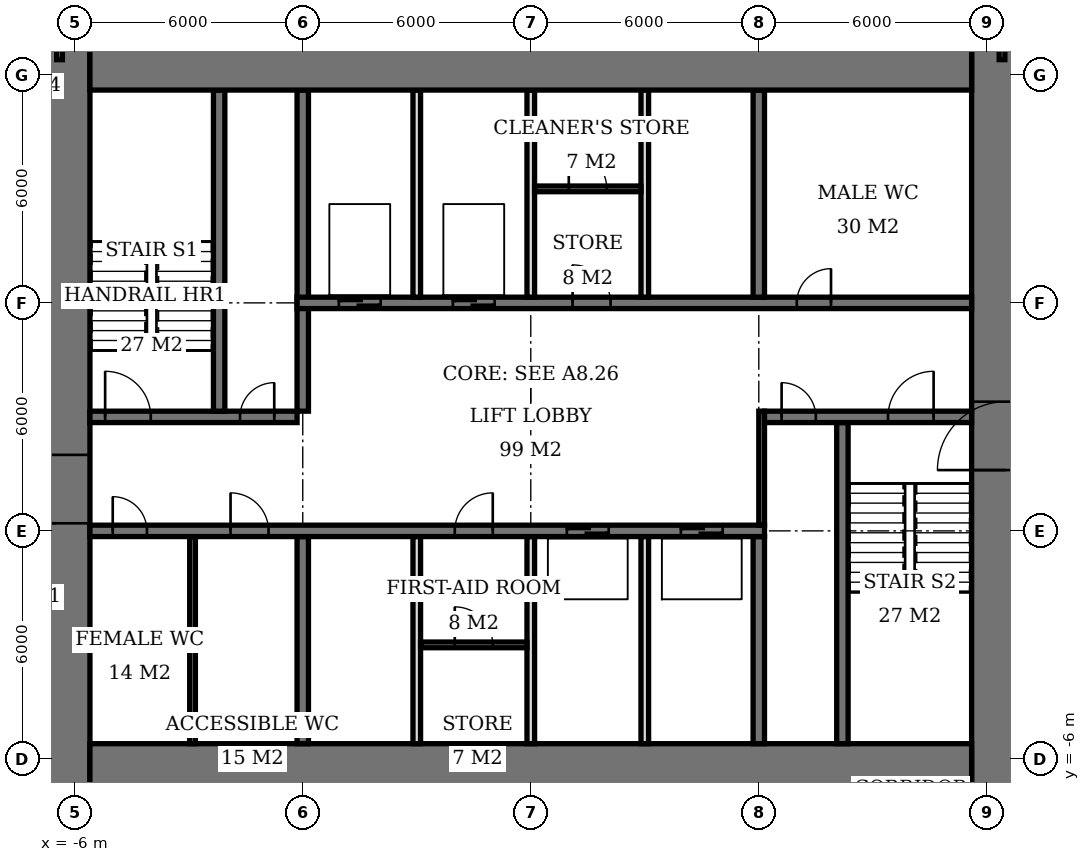
"""IFC4 building model, lengths in metres.
Left out: names, types, materials, properties, quantities, classifications, styles, units other than length and angle.
Written with IfcOpenShell. Run it as: python <this file> out.ifc"""

import sys

from ifc_helpers import new_model, si_unit, direction, frame, frame_2d, origin, place, context, subcontext, project, spatial, rectangle, extrude, element, fill, save


model = new_model("IFC4")
c1 = context("Model", 3, precision=1e-05, world=origin(), true_north=direction((0.0, 1.0)))
c2 = subcontext(c1, "Body", "Model", "MODEL_VIEW")
j1 = project(units=[si_unit("LENGTHUNIT", "METRE"), si_unit("PLANEANGLEUNIT", "RADIAN")], contexts=[c1])
p1 = place(None, origin())
s1 = spatial("IfcSite", under=j1, at=p1, CompositionType="ELEMENT")
p2 = place(p1, origin())
s2 = spatial("IfcBuilding", under=s1, at=p2, CompositionType="ELEMENT")
p3 = place(p2, frame((0.0, 0.0, 204.5)))
s3 = spatial("IfcBuildingStorey", under=s2, at=p3, CompositionType="ELEMENT", Elevation=204.5)
for number, where, z_axis, x_axis in (
    (1, (-5.6, -6.6, 0.0), (0.0, 0.0, 1.0), (1.0, 0.0, 0.0)),
    (2, (-5.6, 12.6, 0.0), (0.0, 0.0, 1.0), (1.0, 0.0, 0.0)),
):
    element("IfcWall", number, at=place(p3, frame(where, z_axis=z_axis, x_axis=x_axis)), inside=s3, PredefinedType="SHEAR", context=c2, shape_type="SweptSolid", body=[
        extrude(rectangle(XDim=23.2, YDim=2.0, at=frame_2d((11.6, 0.0))), origin(), (0.0, 0.0, 1.0), 3.9),
    ])
p4 = place(p3, frame((-6.5, -7.6, 0.0), z_axis=(0.0, 0.0, 1.0), x_axis=(0.0, 1.0, 0.0)))
e3 = element("IfcWall", 3, at=p4, inside=s3, PredefinedType="SHEAR", context=c2, shape_type="SweptSolid", body=[
    extrude(rectangle(XDim=21.2, YDim=1.8, at=frame_2d((10.6, 0.0))), origin(), (0.0, 0.0, 1.0), 3.9),
])
p5 = place(p4, frame((7.8, 0.0, 0.0)))
e4 = element("IfcOpeningElement", 4, at=p5, cuts=e3, PredefinedType="OPENING", context=c2, shape_type="SweptSolid", body=[
    extrude(rectangle(XDim=1.8, YDim=2.4, at=frame_2d((0.9, 1.2))), frame((0.0, 0.91, 0.0), z_axis=(0.0, -1.0, 0.0), x_axis=(1.0, 0.0, 0.0)), (0.0, 0.0, 1.0), 1.82),
])
p6 = place(p3, frame((18.5, -7.6, 0.0), z_axis=(0.0, 0.0, 1.0), x_axis=(0.0, 1.0, 0.0)))
e5 = element("IfcWall", 5, at=p6, inside=s3, PredefinedType="SHEAR", context=c2, shape_type="SweptSolid", body=[
    extrude(rectangle(XDim=21.2, YDim=1.8, at=frame_2d((10.6, 0.0))), origin(), (0.0, 0.0, 1.0), 3.9),
])
p7 = place(p6, frame((9.2, 0.0, 0.0)))
e6 = element("IfcOpeningElement", 6, at=p7, cuts=e5, PredefinedType="OPENING", context=c2, shape_type="SweptSolid", body=[
    extrude(rectangle(XDim=1.8, YDim=2.4, at=frame_2d((0.9, 1.2))), frame((0.0, 0.91, 0.0), z_axis=(0.0, -1.0, 0.0), x_axis=(1.0, 0.0, 0.0)), (0.0, 0.0, 1.0), 1.82),
])
p8 = place(p3, frame((-5.6, 0.0, 0.0), z_axis=(0.0, 0.0, 1.0), x_axis=(1.0, 0.0, 0.0)))
e7 = element("IfcWall", 7, at=p8, inside=s3, PredefinedType="SHEAR", context=c2, shape_type="SweptSolid", body=[
    extrude(rectangle(XDim=17.75, YDim=0.3, at=frame_2d((8.875, 0.0))), origin(), (0.0, 0.0, 1.0), 3.9),
])
p9 = place(p8, frame((0.6, 0.0, 0.0)))
e8 = element("IfcOpeningElement", 8, at=p9, cuts=e7, PredefinedType="OPENING", context=c2, shape_type="SweptSolid", body=[
    extrude(rectangle(XDim=0.9, YDim=2.1, at=frame_2d((0.45, 1.05))), frame((0.0, 0.16, 0.0), z_axis=(0.0, -1.0, 0.0), x_axis=(1.0, 0.0, 0.0)), (0.0, 0.0, 1.0), 0.32),
])
p10 = place(p8, frame((3.7, 0.0, 0.0)))
e9 = element("IfcOpeningElement", 9, at=p10, cuts=e7, PredefinedType="OPENING", context=c2, shape_type="SweptSolid", body=[
    extrude(rectangle(XDim=1.0, YDim=2.1, at=frame_2d((0.5, 1.05))), frame((0.0, 0.16, 0.0), z_axis=(0.0, -1.0, 0.0), x_axis=(1.0, 0.0, 0.0)), (0.0, 0.0, 1.0), 0.32),
])
p11 = place(p8, frame((9.6, 0.0, 0.0)))
e10 = element("IfcOpeningElement", 10, at=p11, cuts=e7, PredefinedType="OPENING", context=c2, shape_type="SweptSolid", body=[
    extrude(rectangle(XDim=1.0, YDim=2.1, at=frame_2d((0.5, 1.05))), frame((0.0, 0.16, 0.0), z_axis=(0.0, -1.0, 0.0), x_axis=(1.0, 0.0, 0.0)), (0.0, 0.0, 1.0), 0.32),
])
p12 = place(p8, frame((12.55, 0.0, 0.0)))
e11 = element("IfcOpeningElement", 11, at=p12, cuts=e7, PredefinedType="OPENING", context=c2, shape_type="SweptSolid", body=[
    extrude(rectangle(XDim=1.1, YDim=2.1, at=frame_2d((0.55, 1.05))), frame((0.0, 0.16, 0.0), z_axis=(0.0, -1.0, 0.0), x_axis=(1.0, 0.0, 0.0)), (0.0, 0.0, 1.0), 0.32),
])
p13 = place(p8, frame((15.55, 0.0, 0.0)))
e12 = element("IfcOpeningElement", 12, at=p13, cuts=e7, PredefinedType="OPENING", context=c2, shape_type="SweptSolid", body=[
    extrude(rectangle(XDim=1.1, YDim=2.1, at=frame_2d((0.55, 1.05))), frame((0.0, 0.16, 0.0), z_axis=(0.0, -1.0, 0.0), x_axis=(1.0, 0.0, 0.0)), (0.0, 0.0, 1.0), 0.32),
])
p14 = place(p3, frame((-5.6, 3.0, 0.0), z_axis=(0.0, 0.0, 1.0), x_axis=(1.0, 0.0, 0.0)))
e13 = element("IfcWall", 13, at=p14, inside=s3, PredefinedType="SHEAR", context=c2, shape_type="SweptSolid", body=[
    extrude(rectangle(XDim=5.45, YDim=0.3, at=frame_2d((2.725, 0.0))), origin(), (0.0, 0.0, 1.0), 3.9),
])
p15 = place(p14, frame((0.4, 0.0, 0.0)))
e14 = element("IfcOpeningElement", 14, at=p15, cuts=e13, PredefinedType="OPENING", context=c2, shape_type="SweptSolid", body=[
    extrude(rectangle(XDim=1.2, YDim=2.1, at=frame_2d((0.6, 1.05))), frame((0.0, 0.16, 0.0), z_axis=(0.0, -1.0, 0.0), x_axis=(1.0, 0.0, 0.0)), (0.0, 0.0, 1.0), 0.32),
])
p16 = place(p14, frame((3.95, 0.0, 0.0)))
e15 = element("IfcOpeningElement", 15, at=p16, cuts=e13, PredefinedType="OPENING", context=c2, shape_type="SweptSolid", body=[
    extrude(rectangle(XDim=0.9, YDim=2.1, at=frame_2d((0.45, 1.05))), frame((0.0, 0.16, 0.0), z_axis=(0.0, -1.0, 0.0), x_axis=(1.0, 0.0, 0.0)), (0.0, 0.0, 1.0), 0.32),
])
p17 = place(p3, frame((12.15, 3.0, 0.0), z_axis=(0.0, 0.0, 1.0), x_axis=(1.0, 0.0, 0.0)))
e16 = element("IfcWall", 16, at=p17, inside=s3, PredefinedType="SHEAR", context=c2, shape_type="SweptSolid", body=[
    extrude(rectangle(XDim=5.45, YDim=0.3, at=frame_2d((2.725, 0.0))), origin(), (0.0, 0.0, 1.0), 3.9),
])
p18 = place(p17, frame((3.25, 0.0, 0.0)))
e17 = element("IfcOpeningElement", 17, at=p18, cuts=e16, PredefinedType="OPENING", context=c2, shape_type="SweptSolid", body=[
    extrude(rectangle(XDim=1.2, YDim=2.1, at=frame_2d((0.6, 1.05))), frame((0.0, 0.16, 0.0), z_axis=(0.0, -1.0, 0.0), x_axis=(1.0, 0.0, 0.0)), (0.0, 0.0, 1.0), 0.32),
])
p19 = place(p17, frame((0.45, 0.0, 0.0)))
e18 = element("IfcOpeningElement", 18, at=p19, cuts=e16, PredefinedType="OPENING", context=c2, shape_type="SweptSolid", body=[
    extrude(rectangle(XDim=0.9, YDim=2.1, at=frame_2d((0.45, 1.05))), frame((0.0, 0.16, 0.0), z_axis=(0.0, -1.0, 0.0), x_axis=(1.0, 0.0, 0.0)), (0.0, 0.0, 1.0), 0.32),
])
p20 = place(p3, frame((-0.15, 6.0, 0.0), z_axis=(0.0, 0.0, 1.0), x_axis=(1.0, 0.0, 0.0)))
e19 = element("IfcWall", 19, at=p20, inside=s3, PredefinedType="SHEAR", context=c2, shape_type="SweptSolid", body=[
    extrude(rectangle(XDim=17.75, YDim=0.3, at=frame_2d((8.875, 0.0))), origin(), (0.0, 0.0, 1.0), 3.9),
])
p21 = place(p20, frame((13.15, 0.0, 0.0)))
e20 = element("IfcOpeningElement", 20, at=p21, cuts=e19, PredefinedType="OPENING", context=c2, shape_type="SweptSolid", body=[
    extrude(rectangle(XDim=0.9, YDim=2.1, at=frame_2d((0.45, 1.05))), frame((0.0, 0.16, 0.0), z_axis=(0.0, -1.0, 0.0), x_axis=(1.0, 0.0, 0.0)), (0.0, 0.0, 1.0), 0.32),
])
p22 = place(p20, frame((7.25, 0.0, 0.0)))
e21 = element("IfcOpeningElement", 21, at=p22, cuts=e19, PredefinedType="OPENING", context=c2, shape_type="SweptSolid", body=[
    extrude(rectangle(XDim=1.0, YDim=2.1, at=frame_2d((0.5, 1.05))), frame((0.0, 0.16, 0.0), z_axis=(0.0, -1.0, 0.0), x_axis=(1.0, 0.0, 0.0)), (0.0, 0.0, 1.0), 0.32),
])
p23 = place(p20, frame((1.1, 0.0, 0.0)))
e22 = element("IfcOpeningElement", 22, at=p23, cuts=e19, PredefinedType="OPENING", context=c2, shape_type="SweptSolid", body=[
    extrude(rectangle(XDim=1.1, YDim=2.1, at=frame_2d((0.55, 1.05))), frame((0.0, 0.16, 0.0), z_axis=(0.0, -1.0, 0.0), x_axis=(1.0, 0.0, 0.0)), (0.0, 0.0, 1.0), 0.32),
])
p24 = place(p20, frame((4.1, 0.0, 0.0)))
e23 = element("IfcOpeningElement", 23, at=p24, cuts=e19, PredefinedType="OPENING", context=c2, shape_type="SweptSolid", body=[
    extrude(rectangle(XDim=1.1, YDim=2.1, at=frame_2d((0.55, 1.05))), frame((0.0, 0.16, 0.0), z_axis=(0.0, -1.0, 0.0), x_axis=(1.0, 0.0, 0.0)), (0.0, 0.0, 1.0), 0.32),
])
p25 = place(p3, frame((0.0, -5.6, 0.0), z_axis=(0.0, 0.0, 1.0), x_axis=(0.0, 1.0, 0.0)))
e24 = element("IfcWall", 24, at=p25, inside=s3, PredefinedType="SHEAR", context=c2, shape_type="SweptSolid", body=[
    extrude(rectangle(XDim=5.45, YDim=0.3, at=frame_2d((2.725, 0.0))), origin(), (0.0, 0.0, 1.0), 3.9),
])
p26 = place(p3, frame((0.0, 3.15, 0.0), z_axis=(0.0, 0.0, 1.0), x_axis=(0.0, 1.0, 0.0)))
e25 = element("IfcWall", 25, at=p26, inside=s3, PredefinedType="SHEAR", context=c2, shape_type="SweptSolid", body=[
    extrude(rectangle(XDim=8.45, YDim=0.3, at=frame_2d((4.225, 0.0))), origin(), (0.0, 0.0, 1.0), 3.9),
])
for number, where, z_axis, x_axis in (
    (26, (12.0, -5.6, 0.0), (0.0, 0.0, 1.0), (0.0, 1.0, 0.0)),
    (27, (12.0, 6.15, 0.0), (0.0, 0.0, 1.0), (0.0, 1.0, 0.0)),
):
    element("IfcWall", number, at=place(p3, frame(where, z_axis=z_axis, x_axis=x_axis)), inside=s3, PredefinedType="SHEAR", context=c2, shape_type="SweptSolid", body=[
        extrude(rectangle(XDim=5.45, YDim=0.3, at=frame_2d((2.725, 0.0))), origin(), (0.0, 0.0, 1.0), 3.9),
    ])
for number, where, z_axis, x_axis in (
    (28, (-2.2, 3.15, 0.0), (0.0, 0.0, 1.0), (0.0, 1.0, 0.0)),
    (29, (14.2, -5.6, 0.0), (0.0, 0.0, 1.0), (0.0, 1.0, 0.0)),
):
    element("IfcWall", number, at=place(p3, frame(where, z_axis=z_axis, x_axis=x_axis)), inside=s3, PredefinedType="SHEAR", context=c2, shape_type="SweptSolid", body=[
        extrude(rectangle(XDim=8.45, YDim=0.3, at=frame_2d((4.225, 0.0))), origin(), (0.0, 0.0, 1.0), 3.9),
    ])
for number, where, z_axis, x_axis in (
    (30, (3.0, 6.15, 0.0), (0.0, 0.0, 1.0), (0.0, 1.0, 0.0)),
    (31, (6.0, 6.15, 0.0), (0.0, 0.0, 1.0), (0.0, 1.0, 0.0)),
    (32, (9.0, 6.15, 0.0), (0.0, 0.0, 1.0), (0.0, 1.0, 0.0)),
    (33, (3.0, -5.6, 0.0), (0.0, 0.0, 1.0), (0.0, 1.0, 0.0)),
    (34, (6.0, -5.6, 0.0), (0.0, 0.0, 1.0), (0.0, 1.0, 0.0)),
    (35, (9.0, -5.6, 0.0), (0.0, 0.0, 1.0), (0.0, 1.0, 0.0)),
):
    element("IfcWall", number, at=place(p3, frame(where, z_axis=z_axis, x_axis=x_axis)), inside=s3, PredefinedType="SOLIDWALL", context=c2, shape_type="SweptSolid", body=[
        extrude(rectangle(XDim=5.45, YDim=0.2, at=frame_2d((2.725, 0.0))), origin(), (0.0, 0.0, 1.0), 3.9),
    ])
p27 = place(p3, frame((-2.9, -5.6, 0.0), z_axis=(0.0, 0.0, 1.0), x_axis=(0.0, 1.0, 0.0)))
e36 = element("IfcWall", 36, at=p27, inside=s3, PredefinedType="PLUMBINGWALL", context=c2, shape_type="SweptSolid", body=[
    extrude(rectangle(XDim=5.45, YDim=0.15, at=frame_2d((2.725, 0.0))), origin(), (0.0, 0.0, 1.0), 3.65),
])
p28 = place(p3, frame((6.1, 9.0, 0.0), z_axis=(0.0, 0.0, 1.0), x_axis=(1.0, 0.0, 0.0)))
e37 = element("IfcWall", 37, at=p28, inside=s3, PredefinedType="PARTITIONING", context=c2, shape_type="SweptSolid", body=[
    extrude(rectangle(XDim=2.8, YDim=0.15, at=frame_2d((1.4, 0.0))), origin(), (0.0, 0.0, 1.0), 3.65),
])
p29 = place(p28, frame((0.9, 0.0, 0.0)))
e38 = element("IfcOpeningElement", 38, at=p29, cuts=e37, PredefinedType="OPENING", context=c2, shape_type="SweptSolid", body=[
    extrude(rectangle(XDim=1.0, YDim=2.1, at=frame_2d((0.5, 1.05))), frame((0.0, 0.085, 0.0), z_axis=(0.0, -1.0, 0.0), x_axis=(1.0, 0.0, 0.0)), (0.0, 0.0, 1.0), 0.17),
])
p30 = place(p3, frame((3.1, -3.0, 0.0), z_axis=(0.0, 0.0, 1.0), x_axis=(1.0, 0.0, 0.0)))
e39 = element("IfcWall", 39, at=p30, inside=s3, PredefinedType="PARTITIONING", context=c2, shape_type="SweptSolid", body=[
    extrude(rectangle(XDim=2.8, YDim=0.15, at=frame_2d((1.4, 0.0))), origin(), (0.0, 0.0, 1.0), 3.65),
])
p31 = place(p30, frame((0.9, 0.0, 0.0)))
e40 = element("IfcOpeningElement", 40, at=p31, cuts=e39, PredefinedType="OPENING", context=c2, shape_type="SweptSolid", body=[
    extrude(rectangle(XDim=1.0, YDim=2.1, at=frame_2d((0.5, 1.05))), frame((0.0, 0.085, 0.0), z_axis=(0.0, -1.0, 0.0), x_axis=(1.0, 0.0, 0.0)), (0.0, 0.0, 1.0), 0.17),
])
p32 = place(p3, frame((-6.4, 12.4, 0.0), z_axis=(0.0, 0.0, 1.0), x_axis=(0.0, 1.0, 0.0)))
e41 = element("IfcWall", 41, at=p32, inside=s3, PredefinedType="PARTITIONING", context=c2, shape_type="SweptSolid", body=[
    extrude(rectangle(XDim=1.2, YDim=0.15, at=frame_2d((0.6, 0.0))), origin(), (0.0, 0.0, 1.0), 3.65),
])
p33 = place(p3, frame((10.5, 12.4, 0.0), z_axis=(0.0, 0.0, 1.0), x_axis=(0.0, 1.0, 0.0)))
e42 = element("IfcWall", 42, at=p33, inside=s3, PredefinedType="PARTITIONING", context=c2, shape_type="SweptSolid", body=[
    extrude(rectangle(XDim=7.025, YDim=0.15, at=frame_2d((3.513, 0.0))), origin(), (0.0, 0.0, 1.0), 3.65),
])
p34 = place(p3, frame((18.4, 12.4, 0.0), z_axis=(0.0, 0.0, 1.0), x_axis=(0.0, 1.0, 0.0)))
e43 = element("IfcWall", 43, at=p34, inside=s3, PredefinedType="PARTITIONING", context=c2, shape_type="SweptSolid", body=[
    extrude(rectangle(XDim=1.2, YDim=0.15, at=frame_2d((0.6, 0.0))), origin(), (0.0, 0.0, 1.0), 3.65),
])
p35 = place(p3, frame((12.075, 0.15, 0.0), z_axis=(0.0, 0.0, 1.0), x_axis=(0.0, 1.0, 0.0)))
e44 = element("IfcWall", 44, at=p35, inside=s3, PredefinedType="PARTITIONING", context=c2, shape_type="SweptSolid", body=[
    extrude(rectangle(XDim=3.0, YDim=0.15, at=frame_2d((1.5, 0.0))), origin(), (0.0, 0.0, 1.0), 3.65),
])
p36 = place(p5, origin())
e45 = element("IfcDoor", 45, at=p36, inside=s3, OperationType="DOUBLE_DOOR_SINGLE_SWING", PredefinedType="DOOR", context=c2, shape_type="SweptSolid", body=[
    extrude(rectangle(XDim=1.8, YDim=2.4, at=frame_2d((0.9, 1.2))), frame((0.0, 0.025, 0.0), z_axis=(0.0, -1.0, 0.0), x_axis=(1.0, 0.0, 0.0)), (0.0, 0.0, 1.0), 0.05),
])
fill(e4, e45)
p37 = place(p7, origin())
e46 = element("IfcDoor", 46, at=p37, inside=s3, OperationType="DOUBLE_DOOR_SINGLE_SWING", PredefinedType="DOOR", context=c2, shape_type="SweptSolid", body=[
    extrude(rectangle(XDim=1.8, YDim=2.4, at=frame_2d((0.9, 1.2))), frame((0.0, 0.025, 0.0), z_axis=(0.0, -1.0, 0.0), x_axis=(1.0, 0.0, 0.0)), (0.0, 0.0, 1.0), 0.05),
])
fill(e6, e46)
p38 = place(p15, origin())
e47 = element("IfcDoor", 47, at=p38, inside=s3, OperationType="SINGLE_SWING_LEFT", PredefinedType="DOOR", context=c2, shape_type="SweptSolid", body=[
    extrude(rectangle(XDim=1.2, YDim=2.1, at=frame_2d((0.6, 1.05))), frame((0.0, 0.025, 0.0), z_axis=(0.0, -1.0, 0.0), x_axis=(1.0, 0.0, 0.0)), (0.0, 0.0, 1.0), 0.05),
])
fill(e14, e47)
p39 = place(p16, origin())
e48 = element("IfcDoor", 48, at=p39, inside=s3, OperationType="SINGLE_SWING_RIGHT", PredefinedType="DOOR", context=c2, shape_type="SweptSolid", body=[
    extrude(rectangle(XDim=0.9, YDim=2.1, at=frame_2d((0.45, 1.05))), frame((0.0, 0.025, 0.0), z_axis=(0.0, -1.0, 0.0), x_axis=(1.0, 0.0, 0.0)), (0.0, 0.0, 1.0), 0.05),
])
fill(e15, e48)
p40 = place(p18, origin())
e49 = element("IfcDoor", 49, at=p40, inside=s3, OperationType="SINGLE_SWING_RIGHT", PredefinedType="DOOR", context=c2, shape_type="SweptSolid", body=[
    extrude(rectangle(XDim=1.2, YDim=2.1, at=frame_2d((0.6, 1.05))), frame((0.0, 0.025, 0.0), z_axis=(0.0, -1.0, 0.0), x_axis=(1.0, 0.0, 0.0)), (0.0, 0.0, 1.0), 0.05),
])
fill(e17, e49)
p41 = place(p19, origin())
e50 = element("IfcDoor", 50, at=p41, inside=s3, OperationType="SINGLE_SWING_LEFT", PredefinedType="DOOR", context=c2, shape_type="SweptSolid", body=[
    extrude(rectangle(XDim=0.9, YDim=2.1, at=frame_2d((0.45, 1.05))), frame((0.0, 0.025, 0.0), z_axis=(0.0, -1.0, 0.0), x_axis=(1.0, 0.0, 0.0)), (0.0, 0.0, 1.0), 0.05),
])
fill(e18, e50)
p42 = place(p9, origin())
e51 = element("IfcDoor", 51, at=p42, inside=s3, OperationType="SINGLE_SWING_LEFT", PredefinedType="DOOR", context=c2, shape_type="SweptSolid", body=[
    extrude(rectangle(XDim=0.9, YDim=2.1, at=frame_2d((0.45, 1.05))), frame((0.0, 0.025, 0.0), z_axis=(0.0, -1.0, 0.0), x_axis=(1.0, 0.0, 0.0)), (0.0, 0.0, 1.0), 0.05),
])
fill(e8, e51)
p43 = place(p10, origin())
e52 = element("IfcDoor", 52, at=p43, inside=s3, OperationType="SINGLE_SWING_LEFT", PredefinedType="DOOR", context=c2, shape_type="SweptSolid", body=[
    extrude(rectangle(XDim=1.0, YDim=2.1, at=frame_2d((0.5, 1.05))), frame((0.0, 0.025, 0.0), z_axis=(0.0, -1.0, 0.0), x_axis=(1.0, 0.0, 0.0)), (0.0, 0.0, 1.0), 0.05),
])
fill(e9, e52)
p44 = place(p21, origin())
e53 = element("IfcDoor", 53, at=p44, inside=s3, OperationType="SINGLE_SWING_RIGHT", PredefinedType="DOOR", context=c2, shape_type="SweptSolid", body=[
    extrude(rectangle(XDim=0.9, YDim=2.1, at=frame_2d((0.45, 1.05))), frame((0.0, 0.025, 0.0), z_axis=(0.0, -1.0, 0.0), x_axis=(1.0, 0.0, 0.0)), (0.0, 0.0, 1.0), 0.05),
])
fill(e20, e53)
p45 = place(p29, origin())
e54 = element("IfcDoor", 54, at=p45, inside=s3, OperationType="SINGLE_SWING_LEFT", PredefinedType="DOOR", context=c2, shape_type="SweptSolid", body=[
    extrude(rectangle(XDim=1.0, YDim=2.1, at=frame_2d((0.5, 1.05))), frame((0.0, 0.025, 0.0), z_axis=(0.0, -1.0, 0.0), x_axis=(1.0, 0.0, 0.0)), (0.0, 0.0, 1.0), 0.05),
])
fill(e38, e54)
p46 = place(p22, origin())
e55 = element("IfcDoor", 55, at=p46, inside=s3, OperationType="SINGLE_SWING_LEFT", PredefinedType="DOOR", context=c2, shape_type="SweptSolid", body=[
    extrude(rectangle(XDim=1.0, YDim=2.1, at=frame_2d((0.5, 1.05))), frame((0.0, 0.025, 0.0), z_axis=(0.0, -1.0, 0.0), x_axis=(1.0, 0.0, 0.0)), (0.0, 0.0, 1.0), 0.05),
])
fill(e21, e55)
p47 = place(p31, origin())
e56 = element("IfcDoor", 56, at=p47, inside=s3, OperationType="SINGLE_SWING_LEFT", PredefinedType="DOOR", context=c2, shape_type="SweptSolid", body=[
    extrude(rectangle(XDim=1.0, YDim=2.1, at=frame_2d((0.5, 1.05))), frame((0.0, 0.025, 0.0), z_axis=(0.0, -1.0, 0.0), x_axis=(1.0, 0.0, 0.0)), (0.0, 0.0, 1.0), 0.05),
])
fill(e40, e56)
p48 = place(p11, origin())
e57 = element("IfcDoor", 57, at=p48, inside=s3, OperationType="SINGLE_SWING_RIGHT", PredefinedType="DOOR", context=c2, shape_type="SweptSolid", body=[
    extrude(rectangle(XDim=1.0, YDim=2.1, at=frame_2d((0.5, 1.05))), frame((0.0, 0.025, 0.0), z_axis=(0.0, -1.0, 0.0), x_axis=(1.0, 0.0, 0.0)), (0.0, 0.0, 1.0), 0.05),
])
fill(e10, e57)
p49 = place(p23, origin())
e58 = element("IfcDoor", 58, at=p49, inside=s3, OperationType="DOUBLE_DOOR_SLIDING", PredefinedType="USERDEFINED", context=c2, shape_type="SweptSolid", body=[
    extrude(rectangle(XDim=1.1, YDim=2.1, at=frame_2d((0.55, 1.05))), frame((0.0, 0.025, 0.0), z_axis=(0.0, -1.0, 0.0), x_axis=(1.0, 0.0, 0.0)), (0.0, 0.0, 1.0), 0.05),
])
fill(e22, e58)
p50 = place(p24, origin())
e59 = element("IfcDoor", 59, at=p50, inside=s3, OperationType="DOUBLE_DOOR_SLIDING", PredefinedType="USERDEFINED", context=c2, shape_type="SweptSolid", body=[
    extrude(rectangle(XDim=1.1, YDim=2.1, at=frame_2d((0.55, 1.05))), frame((0.0, 0.025, 0.0), z_axis=(0.0, -1.0, 0.0), x_axis=(1.0, 0.0, 0.0)), (0.0, 0.0, 1.0), 0.05),
])
fill(e23, e59)
p51 = place(p12, origin())
e60 = element("IfcDoor", 60, at=p51, inside=s3, OperationType="DOUBLE_DOOR_SLIDING", PredefinedType="USERDEFINED", context=c2, shape_type="SweptSolid", body=[
    extrude(rectangle(XDim=1.1, YDim=2.1, at=frame_2d((0.55, 1.05))), frame((0.0, 0.025, 0.0), z_axis=(0.0, -1.0, 0.0), x_axis=(1.0, 0.0, 0.0)), (0.0, 0.0, 1.0), 0.05),
])
fill(e11, e60)
p52 = place(p13, origin())
e61 = element("IfcDoor", 61, at=p52, inside=s3, OperationType="DOUBLE_DOOR_SLIDING", PredefinedType="USERDEFINED", context=c2, shape_type="SweptSolid", body=[
    extrude(rectangle(XDim=1.1, YDim=2.1, at=frame_2d((0.55, 1.05))), frame((0.0, 0.025, 0.0), z_axis=(0.0, -1.0, 0.0), x_axis=(1.0, 0.0, 0.0)), (0.0, 0.0, 1.0), 0.05),
])
fill(e12, e61)
save(model, sys.argv[1])
